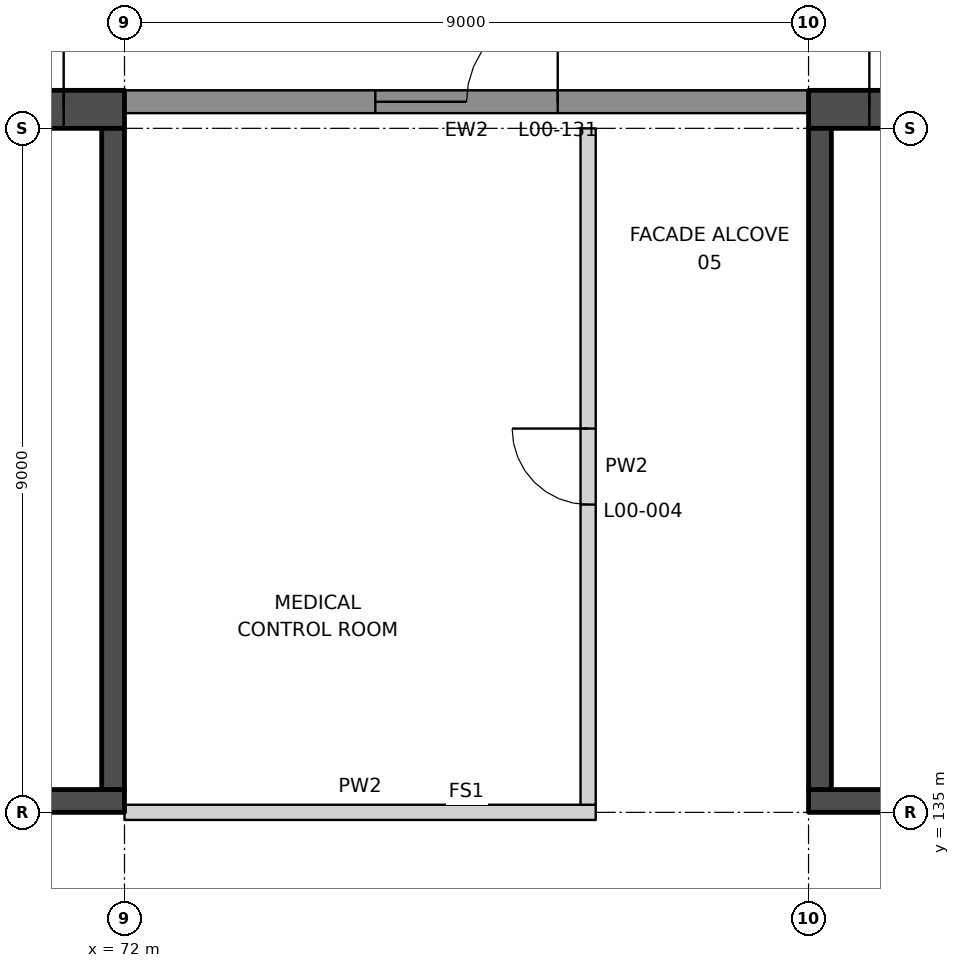
"""IFC4 building model, lengths in metres.
Left out: names, types, materials, properties, quantities, classifications, styles, units other than length and angle.
Written with IfcOpenShell. Run it as: python <this file> out.ifc"""

import sys

from ifc_helpers import new_model, si_unit, direction, frame, frame_2d, origin, place, context, subcontext, project, spatial, rectangle, extrude, element, fill, save


model = new_model("IFC4")
c1 = context("Model", 3, precision=1e-05, world=origin(), true_north=direction((0.0, 1.0)))
c2 = subcontext(c1, "Body", "Model", "MODEL_VIEW")
j1 = project(units=[si_unit("LENGTHUNIT", "METRE"), si_unit("PLANEANGLEUNIT", "RADIAN")], contexts=[c1])
p1 = place(None, origin())
s1 = spatial("IfcSite", under=j1, at=p1, CompositionType="ELEMENT")
p2 = place(p1, origin())
s2 = spatial("IfcBuilding", under=s1, at=p2, CompositionType="ELEMENT")
p3 = place(p2, origin())
s3 = spatial("IfcBuildingStorey", under=s2, at=p3, CompositionType="ELEMENT", Elevation=0.0)
p4 = place(p3, frame((72.0, 135.0, 0.0), z_axis=(0.0, 0.0, 1.0), x_axis=(1.0, 0.0, 0.0)))
e1 = element("IfcWall", 1, at=p4, inside=s3, PredefinedType="PARTITIONING", context=c2, shape_type="SweptSolid", body=[
    extrude(rectangle(XDim=6.2, YDim=0.2, at=frame_2d((3.1, 0.0))), origin(), (0.0, 0.0, 1.0), 5.65),
])
p5 = place(p3, frame((78.1, 135.1, 0.0), z_axis=(0.0, 0.0, 1.0), x_axis=(0.0, 1.0, 0.0)))
e2 = element("IfcWall", 2, at=p5, inside=s3, PredefinedType="PARTITIONING", context=c2, shape_type="SweptSolid", body=[
    extrude(rectangle(XDim=8.9, YDim=0.2, at=frame_2d((4.45, 0.0))), origin(), (0.0, 0.0, 1.0), 7.0),
])
p6 = place(p5, frame((3.95, 0.0, 0.0)))
e3 = element("IfcOpeningElement", 3, at=p6, cuts=e2, PredefinedType="OPENING", context=c2, shape_type="SweptSolid", body=[
    extrude(rectangle(XDim=1.0, YDim=2.1, at=frame_2d((0.5, 1.05))), frame((0.0, 0.11, 0.0), z_axis=(0.0, -1.0, 0.0), x_axis=(1.0, 0.0, 0.0)), (0.0, 0.0, 1.0), 0.22),
])
p7 = place(p3, frame((81.0, 144.35, 0.0), z_axis=(0.0, 0.0, 1.0), x_axis=(-1.0, 0.0, 0.0)))
e4 = element("IfcWall", 4, at=p7, inside=s3, PredefinedType="SOLIDWALL", context=c2, shape_type="SweptSolid", body=[
    extrude(rectangle(XDim=9.0, YDim=0.3, at=frame_2d((4.5, 0.0))), origin(), (0.0, 0.0, 1.0), 7.0),
])
p8 = place(p7, frame((3.3, 0.0, 0.0)))
e5 = element("IfcOpeningElement", 5, at=p8, cuts=e4, PredefinedType="OPENING", context=c2, shape_type="SweptSolid", body=[
    extrude(rectangle(XDim=2.4, YDim=2.4, at=frame_2d((1.2, 1.2))), frame((0.0, 0.16, 0.0), z_axis=(0.0, -1.0, 0.0), x_axis=(1.0, 0.0, 0.0)), (0.0, 0.0, 1.0), 0.32),
])
p9 = place(p3, frame((81.0, 135.15, 0.0), z_axis=(0.0, 0.0, 1.0), x_axis=(1.0, 0.0, 0.0)))
e6 = element("IfcWall", 6, at=p9, inside=s3, PredefinedType="SHEAR", context=c2, shape_type="SweptSolid", body=[
    extrude(rectangle(XDim=18.0, YDim=0.3, at=frame_2d((9.0, 0.0))), origin(), (0.0, 0.0, 1.0), 7.0),
])
p10 = place(p9, frame((1.5, 0.0, 0.0)))
e7 = element("IfcOpeningElement", 7, at=p10, cuts=e6, PredefinedType="OPENING", context=c2, shape_type="SweptSolid", body=[
    extrude(rectangle(XDim=1.2, YDim=2.1, at=frame_2d((0.6, 1.05))), frame((0.0, 0.16, 0.0), z_axis=(0.0, -1.0, 0.0), x_axis=(1.0, 0.0, 0.0)), (0.0, 0.0, 1.0), 0.32),
])
p11 = place(p3, frame((81.0, 144.25, 0.0), z_axis=(0.0, 0.0, 1.0), x_axis=(1.0, 0.0, 0.0)))
e8 = element("IfcWall", 8, at=p11, inside=s3, PredefinedType="SHEAR", context=c2, shape_type="SweptSolid", body=[
    extrude(rectangle(XDim=18.0, YDim=0.5, at=frame_2d((9.0, 0.0))), origin(), (0.0, 0.0, 1.0), 7.0),
])
p12 = place(p11, frame((0.8, 0.0, 0.0)))
e9 = element("IfcOpeningElement", 9, at=p12, cuts=e8, PredefinedType="OPENING", context=c2, shape_type="SweptSolid", body=[
    extrude(rectangle(XDim=2.6, YDim=2.4, at=frame_2d((1.3, 1.2))), frame((0.0, 0.26, 0.0), z_axis=(0.0, -1.0, 0.0), x_axis=(1.0, 0.0, 0.0)), (0.0, 0.0, 1.0), 0.52),
])
p13 = place(p3, frame((81.15, 135.3, 0.0), z_axis=(0.0, 0.0, 1.0), x_axis=(0.0, 1.0, 0.0)))
e10 = element("IfcWall", 10, at=p13, inside=s3, PredefinedType="SHEAR", context=c2, shape_type="SweptSolid", body=[
    extrude(rectangle(XDim=8.7, YDim=0.3, at=frame_2d((4.35, 0.0))), origin(), (0.0, 0.0, 1.0), 7.0),
])
p14 = place(p3, frame((72.0, 135.15, 0.0), z_axis=(0.0, 0.0, 1.0), x_axis=(-1.0, 0.0, 0.0)))
e11 = element("IfcWall", 11, at=p14, inside=s3, PredefinedType="SHEAR", context=c2, shape_type="SweptSolid", body=[
    extrude(rectangle(XDim=18.25, YDim=0.3, at=frame_2d((9.125, 0.0))), origin(), (0.0, 0.0, 1.0), 7.0),
])
p15 = place(p14, frame((1.5, 0.0, 0.0)))
e12 = element("IfcOpeningElement", 12, at=p15, cuts=e11, PredefinedType="OPENING", context=c2, shape_type="SweptSolid", body=[
    extrude(rectangle(XDim=1.2, YDim=2.1, at=frame_2d((0.6, 1.05))), frame((0.0, 0.16, 0.0), z_axis=(0.0, -1.0, 0.0), x_axis=(1.0, 0.0, 0.0)), (0.0, 0.0, 1.0), 0.32),
])
p16 = place(p3, frame((72.0, 144.25, 0.0), z_axis=(0.0, 0.0, 1.0), x_axis=(-1.0, 0.0, 0.0)))
e13 = element("IfcWall", 13, at=p16, inside=s3, PredefinedType="SHEAR", context=c2, shape_type="SweptSolid", body=[
    extrude(rectangle(XDim=18.0, YDim=0.5, at=frame_2d((9.0, 0.0))), origin(), (0.0, 0.0, 1.0), 7.0),
])
p17 = place(p16, frame((0.8, 0.0, 0.0)))
e14 = element("IfcOpeningElement", 14, at=p17, cuts=e13, PredefinedType="OPENING", context=c2, shape_type="SweptSolid", body=[
    extrude(rectangle(XDim=2.6, YDim=2.4, at=frame_2d((1.3, 1.2))), frame((0.0, 0.26, 0.0), z_axis=(0.0, -1.0, 0.0), x_axis=(1.0, 0.0, 0.0)), (0.0, 0.0, 1.0), 0.52),
])
p18 = place(p3, frame((71.85, 135.3, 0.0), z_axis=(0.0, 0.0, 1.0), x_axis=(0.0, 1.0, 0.0)))
e15 = element("IfcWall", 15, at=p18, inside=s3, PredefinedType="SHEAR", context=c2, shape_type="SweptSolid", body=[
    extrude(rectangle(XDim=8.7, YDim=0.3, at=frame_2d((4.35, 0.0))), origin(), (0.0, 0.0, 1.0), 7.0),
])
p19 = place(p6, origin())
e16 = element("IfcDoor", 16, at=p19, inside=s3, OperationType="SINGLE_SWING_RIGHT", PredefinedType="DOOR", context=c2, shape_type="SweptSolid", body=[
    extrude(rectangle(XDim=1.0, YDim=2.1, at=frame_2d((0.5, 1.05))), frame((0.0, 0.025, 0.0), z_axis=(0.0, -1.0, 0.0), x_axis=(1.0, 0.0, 0.0)), (0.0, 0.0, 1.0), 0.05),
])
fill(e3, e16)
p20 = place(p8, frame((2.4, 0.0, 0.0), z_axis=(0.0, 0.0, 1.0), x_axis=(-1.0, 0.0, 0.0)))
e17 = element("IfcDoor", 17, at=p20, inside=s3, OperationType="DOUBLE_DOOR_SINGLE_SWING", PredefinedType="DOOR", context=c2, shape_type="SweptSolid", body=[
    extrude(rectangle(XDim=2.4, YDim=2.4, at=frame_2d((1.2, 1.2))), frame((0.0, 0.025, 0.0), z_axis=(0.0, -1.0, 0.0), x_axis=(1.0, 0.0, 0.0)), (0.0, 0.0, 1.0), 0.05),
])
fill(e5, e17)
p21 = place(p12, origin())
e18 = element("IfcDoor", 18, at=p21, inside=s3, OperationType="DOUBLE_DOOR_SINGLE_SWING", PredefinedType="DOOR", context=c2, shape_type="SweptSolid", body=[
    extrude(rectangle(XDim=2.6, YDim=2.4, at=frame_2d((1.3, 1.2))), frame((0.0, 0.025, 0.0), z_axis=(0.0, -1.0, 0.0), x_axis=(1.0, 0.0, 0.0)), (0.0, 0.0, 1.0), 0.05),
])
fill(e9, e18)
p22 = place(p17, frame((2.6, 0.0, 0.0), z_axis=(0.0, 0.0, 1.0), x_axis=(-1.0, 0.0, 0.0)))
e19 = element("IfcDoor", 19, at=p22, inside=s3, OperationType="DOUBLE_DOOR_SINGLE_SWING", PredefinedType="DOOR", context=c2, shape_type="SweptSolid", body=[
    extrude(rectangle(XDim=2.6, YDim=2.4, at=frame_2d((1.3, 1.2))), frame((0.0, 0.025, 0.0), z_axis=(0.0, -1.0, 0.0), x_axis=(1.0, 0.0, 0.0)), (0.0, 0.0, 1.0), 0.05),
])
fill(e14, e19)
save(model, sys.argv[1])
